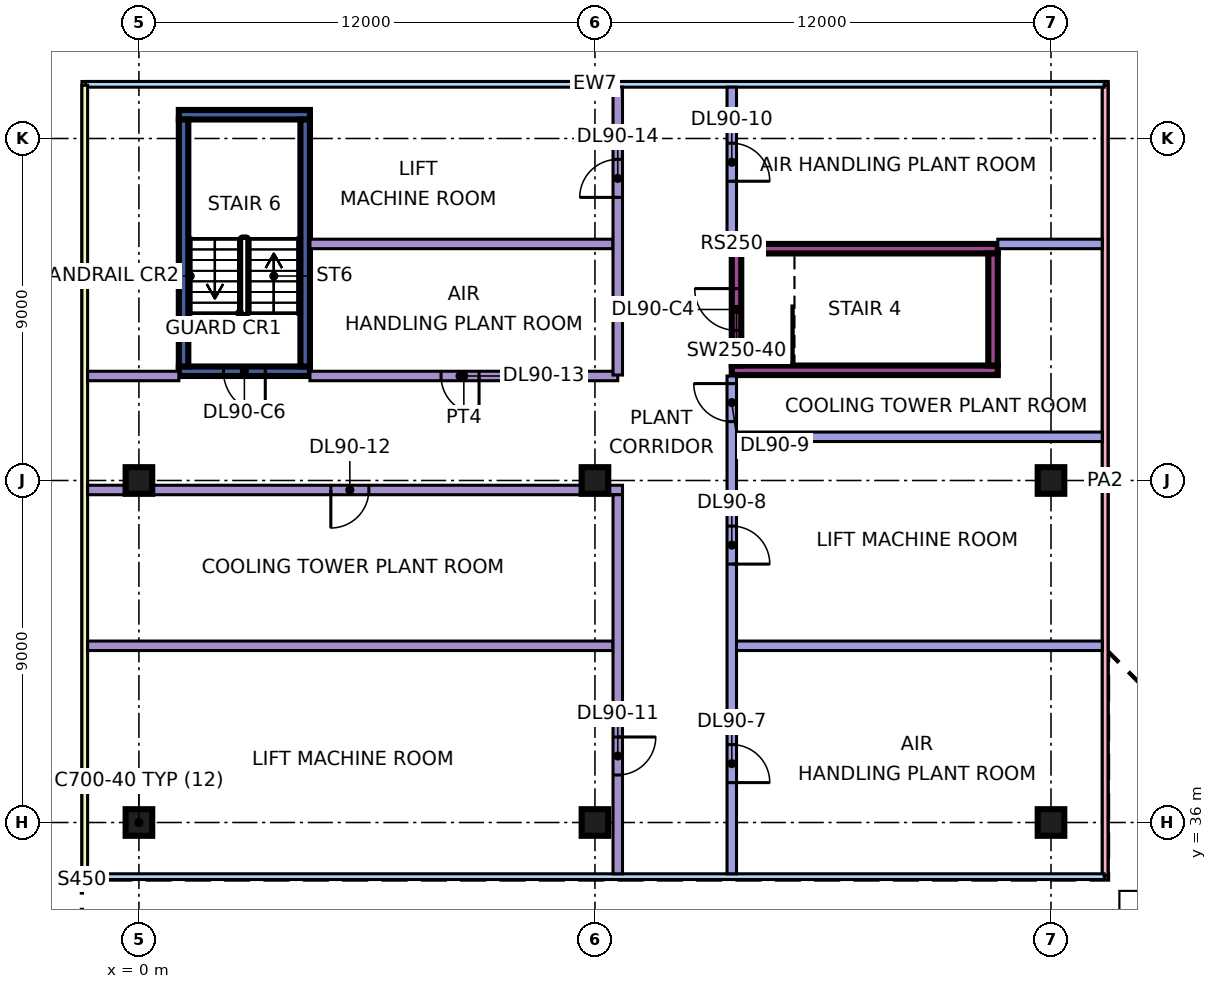
"""IFC4 building model, lengths in metres.
Left out: names, types, materials, properties, quantities, classifications, styles, units other than length and angle.
Written with IfcOpenShell. Run it as: python <this file> out.ifc"""

import sys

from ifc_helpers import new_model, si_unit, direction, frame, frame_2d, origin, origin_2d, place, context, subcontext, project, spatial, polyline, rectangle, outline, extrude, element, fill, save


model = new_model("IFC4")
c1 = context("Model", 3, precision=1e-05, world=origin(), true_north=direction((0.0, 1.0)))
c2 = subcontext(c1, "Body", "Model", "MODEL_VIEW")
j1 = project(units=[si_unit("LENGTHUNIT", "METRE"), si_unit("PLANEANGLEUNIT", "RADIAN")], contexts=[c1])
p1 = place(None, origin())
s1 = spatial("IfcSite", under=j1, at=p1, CompositionType="ELEMENT")
p2 = place(p1, origin())
s2 = spatial("IfcBuilding", under=s1, at=p2, CompositionType="ELEMENT")
p3 = place(p2, frame((0.0, 0.0, 383.9)))
s3 = spatial("IfcBuildingStorey", under=s2, at=p3, CompositionType="ELEMENT", Elevation=383.9)
for number, where, z_axis, x_axis in (
    (1, (0.0, 36.0, 0.0), (0.0, 0.0, 1.0), (1.0, 0.0, 0.0)),
    (2, (0.0, 45.0, 0.0), (0.0, 0.0, 1.0), (1.0, 0.0, 0.0)),
    (3, (12.0, 36.0, 0.0), (0.0, 0.0, 1.0), (1.0, 0.0, 0.0)),
    (4, (12.0, 45.0, 0.0), (0.0, 0.0, 1.0), (1.0, 0.0, 0.0)),
):
    element("IfcColumn", number, at=place(p3, frame(where, z_axis=z_axis, x_axis=x_axis)), inside=s3, PredefinedType="COLUMN", context=c2, shape_type="SweptSolid", body=[
        extrude(rectangle(XDim=0.7, YDim=0.7, at=origin_2d()), origin(), (0.0, 0.0, 1.0), 5.0),
    ])
for number, where, z_axis, x_axis in (
    (5, (24.0, 36.0, 0.0), (0.0, 0.0, 1.0), (1.0, 0.0, 0.0)),
    (6, (24.0, 45.0, 0.0), (0.0, 0.0, 1.0), (1.0, 0.0, 0.0)),
):
    element("IfcColumn", number, at=place(p3, frame(where, z_axis=z_axis, x_axis=x_axis)), inside=s3, PredefinedType="COLUMN", context=c2, shape_type="SweptSolid", body=[
        extrude(rectangle(XDim=0.7, YDim=0.7, at=origin_2d()), origin(), (0.0, 0.0, 1.0), 3.168),
    ])
for number, where, z_axis, x_axis in (
    (7, (15.6, 47.9, 0.0), (0.0, 0.0, 1.0), (1.0, 0.0, 0.0)),
    (8, (15.6, 51.1, 0.0), (0.0, 0.0, 1.0), (1.0, 0.0, 0.0)),
):
    element("IfcWall", number, at=place(p3, frame(where, z_axis=z_axis, x_axis=x_axis)), inside=s3, PredefinedType="SHEAR", context=c2, shape_type="SweptSolid", body=[
        extrude(rectangle(XDim=7.0, YDim=0.25, at=frame_2d((3.5, 0.0))), origin(), (0.0, 0.0, 1.0), 3.17),
    ])
p4 = place(p3, frame((15.725, 48.025, 0.0), z_axis=(0.0, 0.0, 1.0), x_axis=(0.0, 1.0, 0.0)))
e9 = element("IfcWall", 9, at=p4, inside=s3, PredefinedType="SHEAR", context=c2, shape_type="SweptSolid", body=[
    extrude(rectangle(XDim=2.95, YDim=0.25, at=frame_2d((1.475, 0.0))), origin(), (0.0, 0.0, 1.0), 3.17),
])
p5 = place(p4, frame((0.925, 0.0, 0.0)))
e10 = element("IfcOpeningElement", 10, at=p5, cuts=e9, PredefinedType="OPENING", context=c2, shape_type="SweptSolid", body=[
    extrude(rectangle(XDim=1.1, YDim=2.2, at=frame_2d((0.55, 1.1))), frame((0.0, 0.135, 0.0), z_axis=(0.0, -1.0, 0.0), x_axis=(1.0, 0.0, 0.0)), (0.0, 0.0, 1.0), 0.27),
])
p6 = place(p3, frame((22.475, 48.025, 0.0), z_axis=(0.0, 0.0, 1.0), x_axis=(0.0, 1.0, 0.0)))
e11 = element("IfcWall", 11, at=p6, inside=s3, PredefinedType="SHEAR", context=c2, shape_type="SweptSolid", body=[
    extrude(rectangle(XDim=2.95, YDim=0.25, at=frame_2d((1.475, 0.0))), origin(), (0.0, 0.0, 1.0), 3.17),
])
p7 = place(p3, frame((1.05, 47.875, 0.0), z_axis=(0.0, 0.0, 1.0), x_axis=(1.0, 0.0, 0.0)))
e12 = element("IfcWall", 12, at=p7, inside=s3, PredefinedType="SHEAR", context=c2, shape_type="SweptSolid", body=[
    extrude(rectangle(XDim=3.45, YDim=0.25, at=frame_2d((1.725, 0.0))), origin(), (0.0, 0.0, 1.0), 5.0),
])
p8 = place(p7, frame((1.175, 0.0, 0.0)))
e13 = element("IfcOpeningElement", 13, at=p8, cuts=e12, PredefinedType="OPENING", context=c2, shape_type="SweptSolid", body=[
    extrude(rectangle(XDim=1.1, YDim=2.2, at=frame_2d((0.55, 1.1))), frame((0.0, 0.135, 0.0), z_axis=(0.0, -1.0, 0.0), x_axis=(1.0, 0.0, 0.0)), (0.0, 0.0, 1.0), 0.27),
])
p9 = place(p3, frame((1.05, 54.625, 0.0), z_axis=(0.0, 0.0, 1.0), x_axis=(1.0, 0.0, 0.0)))
e14 = element("IfcWall", 14, at=p9, inside=s3, PredefinedType="SHEAR", context=c2, shape_type="SweptSolid", body=[
    extrude(rectangle(XDim=3.45, YDim=0.25, at=frame_2d((1.725, 0.0))), origin(), (0.0, 0.0, 1.0), 5.0),
])
for number, where, z_axis, x_axis in (
    (15, (1.175, 48.0, 0.0), (0.0, 0.0, 1.0), (0.0, 1.0, 0.0)),
    (16, (4.375, 48.0, 0.0), (0.0, 0.0, 1.0), (0.0, 1.0, 0.0)),
):
    element("IfcWall", number, at=place(p3, frame(where, z_axis=z_axis, x_axis=x_axis)), inside=s3, PredefinedType="SHEAR", context=c2, shape_type="SweptSolid", body=[
        extrude(rectangle(XDim=6.5, YDim=0.25, at=frame_2d((3.25, 0.0))), origin(), (0.0, 0.0, 1.0), 5.0),
    ])
p10 = place(p3, frame((25.425, 34.5, 3.807), z_axis=(0.0, 0.0, 1.0), x_axis=(0.0, 1.0, 0.0)))
e17 = element("IfcWall", 17, at=p10, inside=s3, PredefinedType="PARAPET", context=c2, shape_type="SweptSolid", body=[
    extrude(rectangle(XDim=21.0, YDim=0.15, at=frame_2d((10.5, 0.0))), origin(), (0.0, 0.0, 1.0), 0.6),
])
p11 = place(p3, frame((25.425, 34.6, 0.0), z_axis=(0.0, 0.0, 1.0), x_axis=(0.0, 1.0, 0.0)))
e18 = element("IfcWall", 18, at=p11, inside=s3, PredefinedType="SOLIDWALL", context=c2, shape_type="SweptSolid", body=[
    extrude(outline(polyline([(0.0, 0.0), (20.8, 0.0), (20.8, 3.261), (0.0, 3.261), (0.0, 0.0)])), frame((0.0, 0.075, 0.0), z_axis=(0.0, -1.0, 0.0), x_axis=(1.0, 0.0, 0.0)), (0.0, 0.0, 1.0), 0.15),
])
p12 = place(p3, frame((25.4, 55.425, 0.0), z_axis=(0.0, 0.0, 1.0), x_axis=(-1.0, 0.0, 0.0)))
e19 = element("IfcWall", 19, at=p12, inside=s3, PredefinedType="SOLIDWALL", context=c2, shape_type="SweptSolid", body=[
    extrude(outline(polyline([(0.0, 0.0), (26.8, 0.0), (26.8, 4.6), (6.948, 4.6), (5.956, 4.591), (0.0, 3.266), (0.0, 0.0)])), frame((0.0, 0.075, 0.0), z_axis=(0.0, -1.0, 0.0), x_axis=(1.0, 0.0, 0.0)), (0.0, 0.0, 1.0), 0.15),
])
p13 = place(p3, frame((-1.425, 55.4, 0.0), z_axis=(0.0, 0.0, 1.0), x_axis=(0.0, -1.0, 0.0)))
e20 = element("IfcWall", 20, at=p13, inside=s3, PredefinedType="SOLIDWALL", context=c2, shape_type="SweptSolid", body=[
    extrude(rectangle(XDim=20.8, YDim=0.15, at=frame_2d((10.4, 0.0))), origin(), (0.0, 0.0, 1.0), 4.6),
])
p14 = place(p3, frame((-1.4, 34.575, 0.0), z_axis=(0.0, 0.0, 1.0), x_axis=(1.0, 0.0, 0.0)))
e21 = element("IfcWall", 21, at=p14, inside=s3, PredefinedType="SOLIDWALL", context=c2, shape_type="SweptSolid", body=[
    extrude(outline(polyline([(0.0, 0.0), (26.8, 0.0), (26.8, 3.266), (20.844, 4.591), (19.852, 4.6), (0.0, 4.6), (0.0, 0.0)])), frame((0.0, 0.075, 0.0), z_axis=(0.0, -1.0, 0.0), x_axis=(1.0, 0.0, 0.0)), (0.0, 0.0, 1.0), 0.15),
])
p15 = place(p3, frame((-1.35, 40.65, 0.0), z_axis=(0.0, 0.0, 1.0), x_axis=(1.0, 0.0, 0.0)))
e22 = element("IfcWall", 22, at=p15, inside=s3, PredefinedType="PARTITIONING", context=c2, shape_type="SweptSolid", body=[
    extrude(rectangle(XDim=13.825, YDim=0.25, at=frame_2d((6.913, 0.0))), origin(), (0.0, 0.0, 1.0), 4.6),
])
p16 = place(p3, frame((-1.35, 44.75, 0.0), z_axis=(0.0, 0.0, 1.0), x_axis=(1.0, 0.0, 0.0)))
e23 = element("IfcWall", 23, at=p16, inside=s3, PredefinedType="PARTITIONING", context=c2, shape_type="SweptSolid", body=[
    extrude(rectangle(XDim=14.075, YDim=0.25, at=frame_2d((7.038, 0.0))), origin(), (0.0, 0.0, 1.0), 4.6),
])
p17 = place(p16, frame((6.4, 0.0, 0.0)))
e24 = element("IfcOpeningElement", 24, at=p17, cuts=e23, PredefinedType="OPENING", context=c2, shape_type="SweptSolid", body=[
    extrude(rectangle(XDim=1.0, YDim=2.1, at=frame_2d((0.5, 1.05))), frame((0.0, 0.135, 0.0), z_axis=(0.0, -1.0, 0.0), x_axis=(1.0, 0.0, 0.0)), (0.0, 0.0, 1.0), 0.27),
])
p18 = place(p3, frame((-1.35, 47.75, 0.0), z_axis=(0.0, 0.0, 1.0), x_axis=(1.0, 0.0, 0.0)))
e25 = element("IfcWall", 25, at=p18, inside=s3, PredefinedType="PARTITIONING", context=c2, shape_type="SweptSolid", body=[
    extrude(rectangle(XDim=2.4, YDim=0.25, at=frame_2d((1.2, 0.0))), origin(), (0.0, 0.0, 1.0), 4.6),
])
p19 = place(p3, frame((4.5, 47.75, 0.0), z_axis=(0.0, 0.0, 1.0), x_axis=(1.0, 0.0, 0.0)))
e26 = element("IfcWall", 26, at=p19, inside=s3, PredefinedType="PARTITIONING", context=c2, shape_type="SweptSolid", body=[
    extrude(rectangle(XDim=8.1, YDim=0.25, at=frame_2d((4.05, 0.0))), origin(), (0.0, 0.0, 1.0), 4.6),
])
p20 = place(p19, frame((3.45, 0.0, 0.0)))
e27 = element("IfcOpeningElement", 27, at=p20, cuts=e26, PredefinedType="OPENING", context=c2, shape_type="SweptSolid", body=[
    extrude(rectangle(XDim=1.0, YDim=2.1, at=frame_2d((0.5, 1.05))), frame((0.0, 0.135, 0.0), z_axis=(0.0, -1.0, 0.0), x_axis=(1.0, 0.0, 0.0)), (0.0, 0.0, 1.0), 0.27),
])
p21 = place(p3, frame((4.5, 51.225, 0.0), z_axis=(0.0, 0.0, 1.0), x_axis=(1.0, 0.0, 0.0)))
e28 = element("IfcWall", 28, at=p21, inside=s3, PredefinedType="PARTITIONING", context=c2, shape_type="SweptSolid", body=[
    extrude(rectangle(XDim=7.975, YDim=0.25, at=frame_2d((3.988, 0.0))), origin(), (0.0, 0.0, 1.0), 4.6),
])
p22 = place(p3, frame((12.6, 34.65, 0.0), z_axis=(0.0, 0.0, 1.0), x_axis=(0.0, 1.0, 0.0)))
e29 = element("IfcWall", 29, at=p22, inside=s3, PredefinedType="PARTITIONING", context=c2, shape_type="SweptSolid", body=[
    extrude(rectangle(XDim=9.975, YDim=0.25, at=frame_2d((4.988, 0.0))), origin(), (0.0, 0.0, 1.0), 4.6),
])
p23 = place(p22, frame((2.6, 0.0, 0.0)))
e30 = element("IfcOpeningElement", 30, at=p23, cuts=e29, PredefinedType="OPENING", context=c2, shape_type="SweptSolid", body=[
    extrude(rectangle(XDim=1.0, YDim=2.1, at=frame_2d((0.5, 1.05))), frame((0.0, 0.135, 0.0), z_axis=(0.0, -1.0, 0.0), x_axis=(1.0, 0.0, 0.0)), (0.0, 0.0, 1.0), 0.27),
])
p24 = place(p3, frame((12.6, 47.775, 0.0), z_axis=(0.0, 0.0, 1.0), x_axis=(0.0, 1.0, 0.0)))
e31 = element("IfcWall", 31, at=p24, inside=s3, PredefinedType="PARTITIONING", context=c2, shape_type="SweptSolid", body=[
    extrude(rectangle(XDim=7.575, YDim=0.25, at=frame_2d((3.788, 0.0))), origin(), (0.0, 0.0, 1.0), 4.6),
])
p25 = place(p24, frame((4.675, 0.0, 0.0)))
e32 = element("IfcOpeningElement", 32, at=p25, cuts=e31, PredefinedType="OPENING", context=c2, shape_type="SweptSolid", body=[
    extrude(rectangle(XDim=1.0, YDim=2.1, at=frame_2d((0.5, 1.05))), frame((0.0, 0.135, 0.0), z_axis=(0.0, -1.0, 0.0), x_axis=(1.0, 0.0, 0.0)), (0.0, 0.0, 1.0), 0.27),
])
p26 = place(p3, frame((15.6, 34.65, 0.0), z_axis=(0.0, 0.0, 1.0), x_axis=(0.0, 1.0, 0.0)))
e33 = element("IfcWall", 33, at=p26, inside=s3, PredefinedType="PARTITIONING", context=c2, shape_type="SweptSolid", body=[
    extrude(rectangle(XDim=13.1, YDim=0.25, at=frame_2d((6.55, 0.0))), origin(), (0.0, 0.0, 1.0), 2.817),
])
p27 = place(p26, frame((2.4, 0.0, 0.0)))
e34 = element("IfcOpeningElement", 34, at=p27, cuts=e33, PredefinedType="OPENING", context=c2, shape_type="SweptSolid", body=[
    extrude(rectangle(XDim=1.0, YDim=2.1, at=frame_2d((0.5, 1.05))), frame((0.0, 0.135, 0.0), z_axis=(0.0, -1.0, 0.0), x_axis=(1.0, 0.0, 0.0)), (0.0, 0.0, 1.0), 0.27),
])
p28 = place(p26, frame((8.15, 0.0, 0.0)))
e35 = element("IfcOpeningElement", 35, at=p28, cuts=e33, PredefinedType="OPENING", context=c2, shape_type="SweptSolid", body=[
    extrude(rectangle(XDim=1.0, YDim=2.1, at=frame_2d((0.5, 1.05))), frame((0.0, 0.135, 0.0), z_axis=(0.0, -1.0, 0.0), x_axis=(1.0, 0.0, 0.0)), (0.0, 0.0, 1.0), 0.27),
])
p29 = place(p26, frame((11.9, 0.0, 0.0)))
e36 = element("IfcOpeningElement", 36, at=p29, cuts=e33, PredefinedType="OPENING", context=c2, shape_type="SweptSolid", body=[
    extrude(rectangle(XDim=1.0, YDim=2.1, at=frame_2d((0.5, 1.05))), frame((0.0, 0.135, 0.0), z_axis=(0.0, -1.0, 0.0), x_axis=(1.0, 0.0, 0.0)), (0.0, 0.0, 1.0), 0.27),
])
p30 = place(p3, frame((15.6, 51.225, 0.0), z_axis=(0.0, 0.0, 1.0), x_axis=(0.0, 1.0, 0.0)))
e37 = element("IfcWall", 37, at=p30, inside=s3, PredefinedType="PARTITIONING", context=c2, shape_type="SweptSolid", body=[
    extrude(rectangle(XDim=4.125, YDim=0.25, at=frame_2d((2.062, 0.0))), origin(), (0.0, 0.0, 1.0), 2.817),
])
p31 = place(p30, frame((1.65, 0.0, 0.0)))
e38 = element("IfcOpeningElement", 38, at=p31, cuts=e37, PredefinedType="OPENING", context=c2, shape_type="SweptSolid", body=[
    extrude(rectangle(XDim=1.0, YDim=2.1, at=frame_2d((0.5, 1.05))), frame((0.0, 0.135, 0.0), z_axis=(0.0, -1.0, 0.0), x_axis=(1.0, 0.0, 0.0)), (0.0, 0.0, 1.0), 0.27),
])
for number, where, z_axis, x_axis in (
    (39, (15.725, 40.65, 0.0), (0.0, 0.0, 1.0), (1.0, 0.0, 0.0)),
    (40, (15.725, 46.15, 0.0), (0.0, 0.0, 1.0), (1.0, 0.0, 0.0)),
):
    element("IfcWall", number, at=place(p3, frame(where, z_axis=z_axis, x_axis=x_axis)), inside=s3, PredefinedType="PARTITIONING", context=c2, shape_type="SweptSolid", body=[
        extrude(rectangle(XDim=9.625, YDim=0.25, at=frame_2d((4.812, 0.0))), origin(), (0.0, 0.0, 1.0), 2.817),
    ])
p32 = place(p3, frame((22.6, 51.225, 0.0), z_axis=(0.0, 0.0, 1.0), x_axis=(1.0, 0.0, 0.0)))
e41 = element("IfcWall", 41, at=p32, inside=s3, PredefinedType="PARTITIONING", context=c2, shape_type="SweptSolid", body=[
    extrude(rectangle(XDim=2.75, YDim=0.25, at=frame_2d((1.375, 0.0))), origin(), (0.0, 0.0, 1.0), 2.817),
])
p33 = place(p3, frame((0.0, 0.0, -0.45)))
p34 = place(p33, frame((26.4, 33.0, 0.0)))
p35 = place(p34, frame((0.0, 0.0, 0.4)))
e42 = element("IfcWindow", 42, at=p35, inside=s3, PartitioningType="SINGLE_PANEL", PredefinedType="SKYLIGHT", context=c2, shape_type="SweptSolid", body=[
    extrude(rectangle(XDim=1.2, YDim=2.4, at=origin_2d()), origin(), (0.0, 0.0, 1.0), 0.05),
])
p36 = place(p5, frame((1.1, 0.0, 0.0), z_axis=(0.0, 0.0, 1.0), x_axis=(-1.0, 0.0, 0.0)))
e43 = element("IfcDoor", 43, at=p36, inside=s3, OperationType="SINGLE_SWING_RIGHT", PredefinedType="DOOR", context=c2, shape_type="SweptSolid", body=[
    extrude(rectangle(XDim=1.1, YDim=2.2, at=frame_2d((0.55, 1.1))), frame((0.0, 0.025, 0.0), z_axis=(0.0, -1.0, 0.0), x_axis=(1.0, 0.0, 0.0)), (0.0, 0.0, 1.0), 0.05),
])
fill(e10, e43)
p37 = place(p8, origin())
e44 = element("IfcDoor", 44, at=p37, inside=s3, OperationType="SINGLE_SWING_RIGHT", PredefinedType="DOOR", context=c2, shape_type="SweptSolid", body=[
    extrude(rectangle(XDim=1.1, YDim=2.2, at=frame_2d((0.55, 1.1))), frame((0.0, 0.025, 0.0), z_axis=(0.0, -1.0, 0.0), x_axis=(1.0, 0.0, 0.0)), (0.0, 0.0, 1.0), 0.05),
])
fill(e13, e44)
p38 = place(p27, frame((1.0, 0.0, 0.0), z_axis=(0.0, 0.0, 1.0), x_axis=(-1.0, 0.0, 0.0)))
e45 = element("IfcDoor", 45, at=p38, inside=s3, OperationType="SINGLE_SWING_LEFT", PredefinedType="DOOR", context=c2, shape_type="SweptSolid", body=[
    extrude(rectangle(XDim=1.0, YDim=2.1, at=frame_2d((0.5, 1.05))), frame((0.0, 0.025, 0.0), z_axis=(0.0, -1.0, 0.0), x_axis=(1.0, 0.0, 0.0)), (0.0, 0.0, 1.0), 0.05),
])
fill(e34, e45)
p39 = place(p28, frame((1.0, 0.0, 0.0), z_axis=(0.0, 0.0, 1.0), x_axis=(-1.0, 0.0, 0.0)))
e46 = element("IfcDoor", 46, at=p39, inside=s3, OperationType="SINGLE_SWING_LEFT", PredefinedType="DOOR", context=c2, shape_type="SweptSolid", body=[
    extrude(rectangle(XDim=1.0, YDim=2.1, at=frame_2d((0.5, 1.05))), frame((0.0, 0.025, 0.0), z_axis=(0.0, -1.0, 0.0), x_axis=(1.0, 0.0, 0.0)), (0.0, 0.0, 1.0), 0.05),
])
fill(e35, e46)
p40 = place(p29, frame((1.0, 0.0, 0.0), z_axis=(0.0, 0.0, 1.0), x_axis=(-1.0, 0.0, 0.0)))
e47 = element("IfcDoor", 47, at=p40, inside=s3, OperationType="SINGLE_SWING_RIGHT", PredefinedType="DOOR", context=c2, shape_type="SweptSolid", body=[
    extrude(rectangle(XDim=1.0, YDim=2.1, at=frame_2d((0.5, 1.05))), frame((0.0, 0.025, 0.0), z_axis=(0.0, -1.0, 0.0), x_axis=(1.0, 0.0, 0.0)), (0.0, 0.0, 1.0), 0.05),
])
fill(e36, e47)
p41 = place(p31, frame((1.0, 0.0, 0.0), z_axis=(0.0, 0.0, 1.0), x_axis=(-1.0, 0.0, 0.0)))
e48 = element("IfcDoor", 48, at=p41, inside=s3, OperationType="SINGLE_SWING_LEFT", PredefinedType="DOOR", context=c2, shape_type="SweptSolid", body=[
    extrude(rectangle(XDim=1.0, YDim=2.1, at=frame_2d((0.5, 1.05))), frame((0.0, 0.025, 0.0), z_axis=(0.0, -1.0, 0.0), x_axis=(1.0, 0.0, 0.0)), (0.0, 0.0, 1.0), 0.05),
])
fill(e38, e48)
p42 = place(p23, origin())
e49 = element("IfcDoor", 49, at=p42, inside=s3, OperationType="SINGLE_SWING_RIGHT", PredefinedType="DOOR", context=c2, shape_type="SweptSolid", body=[
    extrude(rectangle(XDim=1.0, YDim=2.1, at=frame_2d((0.5, 1.05))), frame((0.0, 0.025, 0.0), z_axis=(0.0, -1.0, 0.0), x_axis=(1.0, 0.0, 0.0)), (0.0, 0.0, 1.0), 0.05),
])
fill(e30, e49)
p43 = place(p17, frame((1.0, 0.0, 0.0), z_axis=(0.0, 0.0, 1.0), x_axis=(-1.0, 0.0, 0.0)))
e50 = element("IfcDoor", 50, at=p43, inside=s3, OperationType="SINGLE_SWING_LEFT", PredefinedType="DOOR", context=c2, shape_type="SweptSolid", body=[
    extrude(rectangle(XDim=1.0, YDim=2.1, at=frame_2d((0.5, 1.05))), frame((0.0, 0.025, 0.0), z_axis=(0.0, -1.0, 0.0), x_axis=(1.0, 0.0, 0.0)), (0.0, 0.0, 1.0), 0.05),
])
fill(e24, e50)
p44 = place(p20, origin())
e51 = element("IfcDoor", 51, at=p44, inside=s3, OperationType="SINGLE_SWING_RIGHT", PredefinedType="DOOR", context=c2, shape_type="SweptSolid", body=[
    extrude(rectangle(XDim=1.0, YDim=2.1, at=frame_2d((0.5, 1.05))), frame((0.0, 0.025, 0.0), z_axis=(0.0, -1.0, 0.0), x_axis=(1.0, 0.0, 0.0)), (0.0, 0.0, 1.0), 0.05),
])
fill(e27, e51)
p45 = place(p25, origin())
e52 = element("IfcDoor", 52, at=p45, inside=s3, OperationType="SINGLE_SWING_LEFT", PredefinedType="DOOR", context=c2, shape_type="SweptSolid", body=[
    extrude(rectangle(XDim=1.0, YDim=2.1, at=frame_2d((0.5, 1.05))), frame((0.0, 0.025, 0.0), z_axis=(0.0, -1.0, 0.0), x_axis=(1.0, 0.0, 0.0)), (0.0, 0.0, 1.0), 0.05),
])
fill(e32, e52)
save(model, sys.argv[1])
